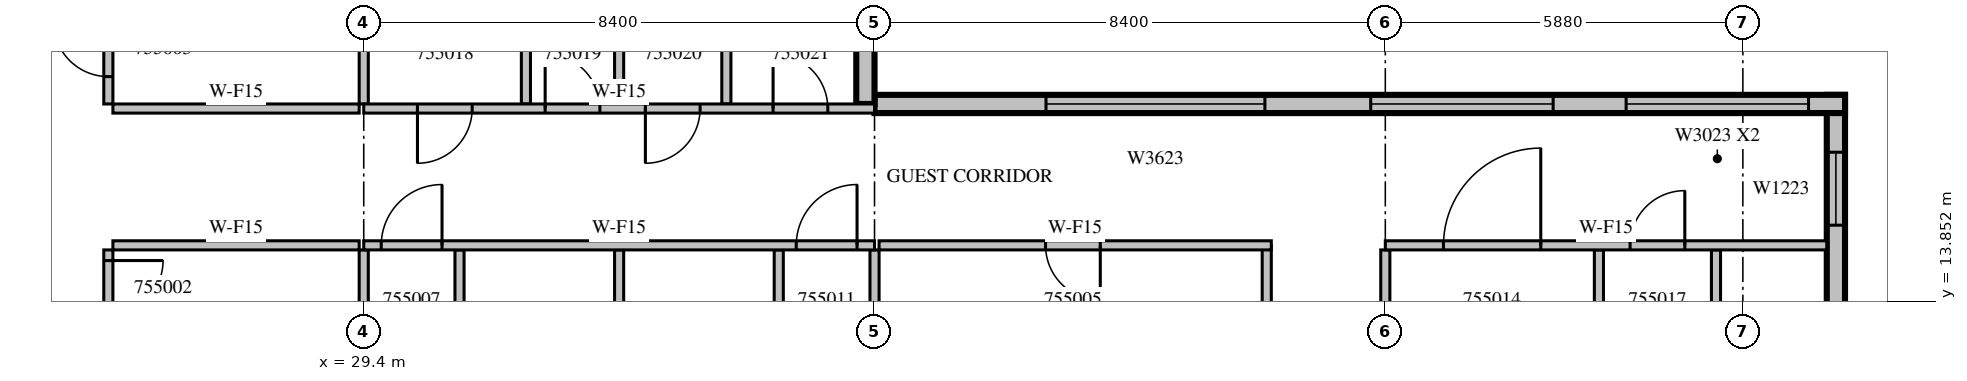
"""IFC4 building model, lengths in metres.
Left out: names, types, materials, properties, quantities, classifications, styles, units other than length and angle.
Written with IfcOpenShell. Run it as: python <this file> out.ifc"""

import sys

from ifc_helpers import new_model, si_unit, direction, frame, frame_2d, origin, place, context, subcontext, project, spatial, rectangle, extrude, source, transform, mapped, element, fill, save


model = new_model("IFC4")
c1 = context("Model", 3, precision=1e-05, world=origin(), true_north=direction((0.0, 1.0)))
c2 = subcontext(c1, "Body", "Model", "MODEL_VIEW")
j1 = project(units=[si_unit("LENGTHUNIT", "METRE"), si_unit("PLANEANGLEUNIT", "RADIAN")], contexts=[c1])
p1 = place(None, origin())
s1 = spatial("IfcSite", under=j1, at=p1, CompositionType="ELEMENT")
p2 = place(p1, origin())
s2 = spatial("IfcBuilding", under=s1, at=p2, CompositionType="ELEMENT")
p3 = place(p2, frame((0.0, 0.0, 242.4)))
s3 = spatial("IfcBuildingStorey", under=s2, at=p3, CompositionType="ELEMENT", Elevation=242.4)
m1 = source(origin(), c2, "Body", "SweptSolid", [
    extrude(rectangle(XDim=6.75, YDim=0.3, at=frame_2d((3.375, 0.0))), origin(), (0.0, 0.0, 1.0), 3.4),
])
p4 = place(p3, frame((53.61, 10.5, 0.0), z_axis=(0.0, 0.0, 1.0), x_axis=(0.0, 1.0, 0.0)))
e1 = element("IfcWall", 1, at=p4, inside=s3, PredefinedType="STANDARD", context=c2, shape_type="MappedRepresentation", body=[
    mapped(m1, transform((0.0, 0.0, 0.0), scale=1.0)),
])
m2 = source(origin(), c2, "Body", "SweptSolid", [
    extrude(rectangle(XDim=1.8, YDim=2.3, at=frame_2d((0.9, 1.15))), frame((0.0, 0.16, 0.0), z_axis=(0.0, -1.0, 0.0), x_axis=(1.0, 0.0, 0.0)), (0.0, 0.0, 1.0), 0.32),
])
p5 = place(p4, frame((0.787, 0.0, 0.6)))
e2 = element("IfcOpeningElement", 2, at=p5, cuts=e1, PredefinedType="OPENING", context=c2, shape_type="MappedRepresentation", body=[
    mapped(m2, transform((0.0, 0.0, 0.0), scale=1.0)),
])
m3 = source(origin(), c2, "Body", "SweptSolid", [
    extrude(rectangle(XDim=1.2, YDim=2.3, at=frame_2d((0.6, 1.15))), frame((0.0, 0.16, 0.0), z_axis=(0.0, -1.0, 0.0), x_axis=(1.0, 0.0, 0.0)), (0.0, 0.0, 1.0), 0.32),
])
p6 = place(p4, frame((4.606, 0.0, 0.6)))
e3 = element("IfcOpeningElement", 3, at=p6, cuts=e1, PredefinedType="OPENING", context=c2, shape_type="MappedRepresentation", body=[
    mapped(m3, transform((0.0, 0.0, 0.0), scale=1.0)),
])
m4 = source(origin(), c2, "Body", "SweptSolid", [
    extrude(rectangle(XDim=15.96, YDim=0.3, at=frame_2d((7.98, 0.0))), origin(), (0.0, 0.0, 1.0), 3.4),
])
p7 = place(p3, frame((53.76, 17.1, 0.0), z_axis=(0.0, 0.0, 1.0), x_axis=(-1.0, 0.0, 0.0)))
e4 = element("IfcWall", 4, at=p7, inside=s3, PredefinedType="STANDARD", context=c2, shape_type="MappedRepresentation", body=[
    mapped(m4, transform((0.0, 0.0, 0.0), scale=1.0)),
])
m5 = source(origin(), c2, "Body", "SweptSolid", [
    extrude(rectangle(XDim=3.0, YDim=2.3, at=frame_2d((1.5, 1.15))), frame((0.0, 0.16, 0.0), z_axis=(0.0, -1.0, 0.0), x_axis=(1.0, 0.0, 0.0)), (0.0, 0.0, 1.0), 0.32),
])
p8 = place(p7, frame((0.6, 0.0, 0.6)))
e5 = element("IfcOpeningElement", 5, at=p8, cuts=e4, PredefinedType="OPENING", context=c2, shape_type="MappedRepresentation", body=[
    mapped(m5, transform((0.0, 0.0, 0.0), scale=1.0)),
])
p9 = place(p7, frame((4.8, 0.0, 0.6)))
e6 = element("IfcOpeningElement", 6, at=p9, cuts=e4, PredefinedType="OPENING", context=c2, shape_type="MappedRepresentation", body=[
    mapped(m5, transform((0.0, 0.0, 0.0), scale=1.0)),
])
m6 = source(origin(), c2, "Body", "SweptSolid", [
    extrude(rectangle(XDim=3.6, YDim=2.3, at=frame_2d((1.8, 1.15))), frame((0.0, 0.16, 0.0), z_axis=(0.0, -1.0, 0.0), x_axis=(1.0, 0.0, 0.0)), (0.0, 0.0, 1.0), 0.32),
])
p10 = place(p7, frame((9.54, 0.0, 0.6)))
e7 = element("IfcOpeningElement", 7, at=p10, cuts=e4, PredefinedType="OPENING", context=c2, shape_type="MappedRepresentation", body=[
    mapped(m6, transform((0.0, 0.0, 0.0), scale=1.0)),
])
m7 = source(origin(), c2, "Body", "SweptSolid", [
    extrude(rectangle(XDim=3.1, YDim=0.3, at=frame_2d((1.55, 0.0))), origin(), (0.0, 0.0, 1.0), 3.4),
])
p11 = place(p3, frame((37.65, 17.1, 0.0), z_axis=(0.0, 0.0, 1.0), x_axis=(0.0, 1.0, 0.0)))
e8 = element("IfcWall", 8, at=p11, inside=s3, PredefinedType="STANDARD", context=c2, shape_type="MappedRepresentation", body=[
    mapped(m7, transform((0.0, 0.0, 0.0), scale=1.0)),
])
p12 = place(p11, frame((1.125, 0.0, 0.6)))
e9 = element("IfcOpeningElement", 9, at=p12, cuts=e8, PredefinedType="OPENING", context=c2, shape_type="MappedRepresentation", body=[
    mapped(m2, transform((0.0, 0.0, 0.0), scale=1.0)),
])
m8 = source(origin(), c2, "Body", "SweptSolid", [
    extrude(rectangle(XDim=11.225, YDim=0.15, at=frame_2d((5.612, 0.0))), origin(), (0.0, 0.0, 1.0), 3.4),
])
p13 = place(p3, frame((25.2, 14.7, 0.0), z_axis=(0.0, 0.0, 1.0), x_axis=(0.0, -1.0, 0.0)))
e10 = element("IfcWall", 10, at=p13, inside=s3, PredefinedType="PARTITIONING", context=c2, shape_type="MappedRepresentation", body=[
    mapped(m8, transform((0.0, 0.0, 0.0), scale=1.0)),
])
m9 = source(origin(), c2, "Body", "SweptSolid", [
    extrude(rectangle(XDim=0.9, YDim=2.1, at=frame_2d((0.45, 1.05))), frame((0.0, 0.085, 0.0), z_axis=(0.0, -1.0, 0.0), x_axis=(1.0, 0.0, 0.0)), (0.0, 0.0, 1.0), 0.17),
])
p14 = place(p13, frame((6.662, 0.0, 0.0)))
e11 = element("IfcOpeningElement", 11, at=p14, cuts=e10, PredefinedType="OPENING", context=c2, shape_type="MappedRepresentation", body=[
    mapped(m9, transform((0.0, 0.0, 0.0), scale=1.0)),
])
p15 = place(p13, frame((0.175, 0.0, 0.0)))
e12 = element("IfcOpeningElement", 12, at=p15, cuts=e10, PredefinedType="OPENING", context=c2, shape_type="MappedRepresentation", body=[
    mapped(m9, transform((0.0, 0.0, 0.0), scale=1.0)),
])
m10 = source(origin(), c2, "Body", "SweptSolid", [
    extrude(rectangle(XDim=3.6, YDim=0.15, at=frame_2d((1.8, 0.0))), origin(), (0.0, 0.0, 1.0), 3.4),
])
p16 = place(p3, frame((25.2, 20.7, 0.0), z_axis=(0.0, 0.0, 1.0), x_axis=(0.0, -1.0, 0.0)))
e13 = element("IfcWall", 13, at=p16, inside=s3, PredefinedType="PARTITIONING", context=c2, shape_type="MappedRepresentation", body=[
    mapped(m10, transform((0.0, 0.0, 0.0), scale=1.0)),
])
p17 = place(p16, frame((2.25, 0.0, 0.0)))
e14 = element("IfcOpeningElement", 14, at=p17, cuts=e13, PredefinedType="OPENING", context=c2, shape_type="MappedRepresentation", body=[
    mapped(m9, transform((0.0, 0.0, 0.0), scale=1.0)),
])
m11 = source(origin(), c2, "Body", "SweptSolid", [
    extrude(rectangle(XDim=4.05, YDim=0.15, at=frame_2d((2.025, 0.0))), origin(), (0.0, 0.0, 1.0), 3.4),
])
for number, where, z_axis, x_axis in (
    (15, (29.325, 14.775, 0.0), (0.0, 0.0, 1.0), (-1.0, 0.0, 0.0)),
    (16, (25.275, 17.025, 0.0), (0.0, 0.0, 1.0), (1.0, 0.0, 0.0)),
):
    element("IfcWall", number, at=place(p3, frame(where, z_axis=z_axis, x_axis=x_axis)), inside=s3, PredefinedType="PARTITIONING", context=c2, shape_type="MappedRepresentation", body=[
        mapped(m11, transform((0.0, 0.0, 0.0), scale=1.0)),
    ])
m12 = source(origin(), c2, "Body", "SweptSolid", [
    extrude(rectangle(XDim=3.801, YDim=0.15, at=frame_2d((1.901, 0.0))), origin(), (0.0, 0.0, 1.0), 3.4),
])
p18 = place(p3, frame((29.4, 10.899, 0.0), z_axis=(0.0, 0.0, 1.0), x_axis=(0.0, 1.0, 0.0)))
e17 = element("IfcWall", 17, at=p18, inside=s3, PredefinedType="PARTITIONING", context=c2, shape_type="MappedRepresentation", body=[
    mapped(m12, transform((0.0, 0.0, 0.0), scale=1.0)),
])
m13 = source(origin(), c2, "Body", "SweptSolid", [
    extrude(rectangle(XDim=3.101, YDim=0.15, at=frame_2d((1.55, 0.0))), origin(), (0.0, 0.0, 1.0), 3.4),
])
p19 = place(p3, frame((29.4, 17.1, 0.0), z_axis=(0.0, 0.0, 1.0), x_axis=(0.0, 1.0, 0.0)))
e18 = element("IfcWall", 18, at=p19, inside=s3, PredefinedType="PARTITIONING", context=c2, shape_type="MappedRepresentation", body=[
    mapped(m13, transform((0.0, 0.0, 0.0), scale=1.0)),
])
m14 = source(origin(), c2, "Body", "SweptSolid", [
    extrude(rectangle(XDim=3.675, YDim=0.15, at=frame_2d((1.837, 0.0))), origin(), (0.0, 0.0, 1.0), 3.4),
])
p20 = place(p3, frame((44.25, 11.1, 0.0), z_axis=(0.0, 0.0, 1.0), x_axis=(0.0, 1.0, 0.0)))
e19 = element("IfcWall", 19, at=p20, inside=s3, PredefinedType="PARTITIONING", context=c2, shape_type="MappedRepresentation", body=[
    mapped(m14, transform((0.0, 0.0, 0.0), scale=1.0)),
])
m15 = source(origin(), c2, "Body", "SweptSolid", [
    extrude(rectangle(XDim=6.45, YDim=0.15, at=frame_2d((3.225, 0.0))), origin(), (0.0, 0.0, 1.0), 3.4),
])
p21 = place(p3, frame((44.325, 14.775, 0.0), z_axis=(0.0, 0.0, 1.0), x_axis=(-1.0, 0.0, 0.0)))
e20 = element("IfcWall", 20, at=p21, inside=s3, PredefinedType="PARTITIONING", context=c2, shape_type="MappedRepresentation", body=[
    mapped(m15, transform((0.0, 0.0, 0.0), scale=1.0)),
])
p22 = place(p21, frame((2.812, 0.0, 0.0)))
e21 = element("IfcOpeningElement", 21, at=p22, cuts=e20, PredefinedType="OPENING", context=c2, shape_type="MappedRepresentation", body=[
    mapped(m9, transform((0.0, 0.0, 0.0), scale=1.0)),
])
m16 = source(origin(), c2, "Body", "SweptSolid", [
    extrude(rectangle(XDim=3.65, YDim=0.15, at=frame_2d((1.825, 0.0))), origin(), (0.0, 0.0, 1.0), 3.4),
])
for number, where, z_axis, x_axis in (
    (22, (30.975, 11.05, 0.0), (0.0, 0.0, 1.0), (0.0, 1.0, 0.0)),
    (23, (33.6, 11.05, 0.0), (0.0, 0.0, 1.0), (0.0, 1.0, 0.0)),
    (24, (36.225, 11.05, 0.0), (0.0, 0.0, 1.0), (0.0, 1.0, 0.0)),
    (25, (37.8, 11.05, 0.0), (0.0, 0.0, 1.0), (0.0, 1.0, 0.0)),
    (26, (49.713, 11.05, 0.0), (0.0, 0.0, 1.0), (0.0, 1.0, 0.0)),
):
    element("IfcWall", number, at=place(p3, frame(where, z_axis=z_axis, x_axis=x_axis)), inside=s3, PredefinedType="PARTITIONING", context=c2, shape_type="MappedRepresentation", body=[
        mapped(m16, transform((0.0, 0.0, 0.0), scale=1.0)),
    ])
p23 = place(p3, frame((51.638, 11.05, 0.0), z_axis=(0.0, 0.0, 1.0), x_axis=(0.0, 1.0, 0.0)))
e27 = element("IfcWall", 27, at=p23, inside=s3, PredefinedType="PARTITIONING", context=c2, shape_type="MappedRepresentation", body=[
    mapped(m16, transform((0.0, 0.0, 0.0), scale=1.0)),
])
p24 = place(p23, frame((1.375, 0.0, 0.0)))
e28 = element("IfcOpeningElement", 28, at=p24, cuts=e27, PredefinedType="OPENING", context=c2, shape_type="MappedRepresentation", body=[
    mapped(m9, transform((0.0, 0.0, 0.0), scale=1.0)),
])
p25 = place(p3, frame((46.2, 11.05, 0.0), z_axis=(0.0, 0.0, 1.0), x_axis=(0.0, 1.0, 0.0)))
e29 = element("IfcWall", 29, at=p25, inside=s3, PredefinedType="PARTITIONING", context=c2, shape_type="MappedRepresentation", body=[
    mapped(m16, transform((0.0, 0.0, 0.0), scale=1.0)),
])
for number, where, z_axis, x_axis in (
    (30, (32.067, 20.7, 0.0), (0.0, 0.0, 1.0), (0.0, -1.0, 0.0)),
    (31, (35.363, 20.7, 0.0), (0.0, 0.0, 1.0), (0.0, -1.0, 0.0)),
    (32, (33.6, 17.1, 0.0), (0.0, 0.0, 1.0), (0.0, 1.0, 0.0)),
):
    element("IfcWall", number, at=place(p3, frame(where, z_axis=z_axis, x_axis=x_axis)), inside=s3, PredefinedType="PARTITIONING", context=c2, shape_type="MappedRepresentation", body=[
        mapped(m10, transform((0.0, 0.0, 0.0), scale=1.0)),
    ])
m17 = source(origin(), c2, "Body", "SweptSolid", [
    extrude(rectangle(XDim=8.4, YDim=0.15, at=frame_2d((4.2, 0.0))), origin(), (0.0, 0.0, 1.0), 3.4),
])
p26 = place(p3, frame((37.8, 14.775, 0.0), z_axis=(0.0, 0.0, 1.0), x_axis=(-1.0, 0.0, 0.0)))
e33 = element("IfcWall", 33, at=p26, inside=s3, PredefinedType="PARTITIONING", context=c2, shape_type="MappedRepresentation", body=[
    mapped(m17, transform((0.0, 0.0, 0.0), scale=1.0)),
])
m18 = source(origin(), c2, "Body", "SweptSolid", [
    extrude(rectangle(XDim=1.0, YDim=2.1, at=frame_2d((0.5, 1.05))), frame((0.0, 0.085, 0.0), z_axis=(0.0, -1.0, 0.0), x_axis=(1.0, 0.0, 0.0)), (0.0, 0.0, 1.0), 0.17),
])
p27 = place(p26, frame((7.112, 0.0, 0.0)))
e34 = element("IfcOpeningElement", 34, at=p27, cuts=e33, PredefinedType="OPENING", context=c2, shape_type="MappedRepresentation", body=[
    mapped(m18, transform((0.0, 0.0, 0.0), scale=1.0)),
])
p28 = place(p26, frame((0.287, 0.0, 0.0)))
e35 = element("IfcOpeningElement", 35, at=p28, cuts=e33, PredefinedType="OPENING", context=c2, shape_type="MappedRepresentation", body=[
    mapped(m18, transform((0.0, 0.0, 0.0), scale=1.0)),
])
m19 = source(origin(), c2, "Body", "SweptSolid", [
    extrude(rectangle(XDim=7.26, YDim=0.15, at=frame_2d((3.63, 0.0))), origin(), (0.0, 0.0, 1.0), 3.4),
])
p29 = place(p3, frame((53.46, 14.775, 0.0), z_axis=(0.0, 0.0, 1.0), x_axis=(-1.0, 0.0, 0.0)))
e36 = element("IfcWall", 36, at=p29, inside=s3, PredefinedType="PARTITIONING", context=c2, shape_type="MappedRepresentation", body=[
    mapped(m19, transform((0.0, 0.0, 0.0), scale=1.0)),
])
m20 = source(origin(), c2, "Body", "SweptSolid", [
    extrude(rectangle(XDim=1.6, YDim=2.1, at=frame_2d((0.8, 1.05))), frame((0.0, 0.085, 0.0), z_axis=(0.0, -1.0, 0.0), x_axis=(1.0, 0.0, 0.0)), (0.0, 0.0, 1.0), 0.17),
])
p30 = place(p29, frame((4.704, 0.0, 0.0)))
e37 = element("IfcOpeningElement", 37, at=p30, cuts=e36, PredefinedType="OPENING", context=c2, shape_type="MappedRepresentation", body=[
    mapped(m20, transform((0.0, 0.0, 0.0), scale=1.0)),
])
p31 = place(p29, frame((2.335, 0.0, 0.0)))
e38 = element("IfcOpeningElement", 38, at=p31, cuts=e36, PredefinedType="OPENING", context=c2, shape_type="MappedRepresentation", body=[
    mapped(m9, transform((0.0, 0.0, 0.0), scale=1.0)),
])
p32 = place(p3, frame((29.4, 17.025, 0.0), z_axis=(0.0, 0.0, 1.0), x_axis=(1.0, 0.0, 0.0)))
e39 = element("IfcWall", 39, at=p32, inside=s3, PredefinedType="PARTITIONING", context=c2, shape_type="MappedRepresentation", body=[
    mapped(m17, transform((0.0, 0.0, 0.0), scale=1.0)),
])
p33 = place(p32, frame((0.883, 0.0, 0.0)))
e40 = element("IfcOpeningElement", 40, at=p33, cuts=e39, PredefinedType="OPENING", context=c2, shape_type="MappedRepresentation", body=[
    mapped(m9, transform((0.0, 0.0, 0.0), scale=1.0)),
])
p34 = place(p32, frame((2.983, 0.0, 0.0)))
e41 = element("IfcOpeningElement", 41, at=p34, cuts=e39, PredefinedType="OPENING", context=c2, shape_type="MappedRepresentation", body=[
    mapped(m9, transform((0.0, 0.0, 0.0), scale=1.0)),
])
p35 = place(p32, frame((4.632, 0.0, 0.0)))
e42 = element("IfcOpeningElement", 42, at=p35, cuts=e39, PredefinedType="OPENING", context=c2, shape_type="MappedRepresentation", body=[
    mapped(m9, transform((0.0, 0.0, 0.0), scale=1.0)),
])
p36 = place(p32, frame((6.732, 0.0, 0.0)))
e43 = element("IfcOpeningElement", 43, at=p36, cuts=e39, PredefinedType="OPENING", context=c2, shape_type="MappedRepresentation", body=[
    mapped(m9, transform((0.0, 0.0, 0.0), scale=1.0)),
])
m21 = source(origin(), c2, "Body", "SweptSolid", [
    extrude(rectangle(XDim=1.2, YDim=2.3, at=frame_2d((0.6, 1.15))), frame((0.0, 0.03, 0.0), z_axis=(0.0, -1.0, 0.0), x_axis=(1.0, 0.0, 0.0)), (0.0, 0.0, 1.0), 0.06),
])
p37 = place(p6, origin())
e44 = element("IfcWindow", 44, at=p37, inside=s3, PartitioningType="SINGLE_PANEL", PredefinedType="WINDOW", context=c2, shape_type="MappedRepresentation", body=[
    mapped(m21, transform((0.0, 0.0, 0.0), scale=1.0)),
])
fill(e3, e44)
m22 = source(origin(), c2, "Body", "SweptSolid", [
    extrude(rectangle(XDim=3.0, YDim=2.3, at=frame_2d((1.5, 1.15))), frame((0.0, 0.03, 0.0), z_axis=(0.0, -1.0, 0.0), x_axis=(1.0, 0.0, 0.0)), (0.0, 0.0, 1.0), 0.06),
])
p38 = place(p8, origin())
e45 = element("IfcWindow", 45, at=p38, inside=s3, PartitioningType="SINGLE_PANEL", PredefinedType="WINDOW", context=c2, shape_type="MappedRepresentation", body=[
    mapped(m22, transform((0.0, 0.0, 0.0), scale=1.0)),
])
fill(e5, e45)
p39 = place(p9, origin())
e46 = element("IfcWindow", 46, at=p39, inside=s3, PartitioningType="SINGLE_PANEL", PredefinedType="WINDOW", context=c2, shape_type="MappedRepresentation", body=[
    mapped(m22, transform((0.0, 0.0, 0.0), scale=1.0)),
])
fill(e6, e46)
m23 = source(origin(), c2, "Body", "SweptSolid", [
    extrude(rectangle(XDim=3.6, YDim=2.3, at=frame_2d((1.8, 1.15))), frame((0.0, 0.03, 0.0), z_axis=(0.0, -1.0, 0.0), x_axis=(1.0, 0.0, 0.0)), (0.0, 0.0, 1.0), 0.06),
])
p40 = place(p10, origin())
e47 = element("IfcWindow", 47, at=p40, inside=s3, PartitioningType="SINGLE_PANEL", PredefinedType="WINDOW", context=c2, shape_type="MappedRepresentation", body=[
    mapped(m23, transform((0.0, 0.0, 0.0), scale=1.0)),
])
fill(e7, e47)
m24 = source(origin(), c2, "Body", "SweptSolid", [
    extrude(rectangle(XDim=0.9, YDim=2.1, at=frame_2d((0.45, 1.05))), frame((0.0, 0.025, 0.0), z_axis=(0.0, -1.0, 0.0), x_axis=(1.0, 0.0, 0.0)), (0.0, 0.0, 1.0), 0.05),
])
p41 = place(p15, origin())
e48 = element("IfcDoor", 48, at=p41, inside=s3, OperationType="SINGLE_SWING_LEFT", PredefinedType="DOOR", context=c2, shape_type="MappedRepresentation", body=[
    mapped(m24, transform((0.0, 0.0, 0.0), scale=1.0)),
])
fill(e12, e48)
p42 = place(p17, origin())
e49 = element("IfcDoor", 49, at=p42, inside=s3, OperationType="SINGLE_SWING_RIGHT", PredefinedType="DOOR", context=c2, shape_type="MappedRepresentation", body=[
    mapped(m24, transform((0.0, 0.0, 0.0), scale=1.0)),
])
fill(e14, e49)
p43 = place(p22, origin())
e50 = element("IfcDoor", 50, at=p43, inside=s3, OperationType="SINGLE_SWING_LEFT", PredefinedType="DOOR", context=c2, shape_type="MappedRepresentation", body=[
    mapped(m24, transform((0.0, 0.0, 0.0), scale=1.0)),
])
fill(e21, e50)
m25 = source(origin(), c2, "Body", "SweptSolid", [
    extrude(rectangle(XDim=1.0, YDim=2.1, at=frame_2d((0.5, 1.05))), frame((0.0, 0.025, 0.0), z_axis=(0.0, -1.0, 0.0), x_axis=(1.0, 0.0, 0.0)), (0.0, 0.0, 1.0), 0.05),
])
p44 = place(p27, origin())
e51 = element("IfcDoor", 51, at=p44, inside=s3, OperationType="SINGLE_SWING_RIGHT", PredefinedType="DOOR", context=c2, shape_type="MappedRepresentation", body=[
    mapped(m25, transform((0.0, 0.0, 0.0), scale=1.0)),
])
fill(e34, e51)
p45 = place(p28, origin())
e52 = element("IfcDoor", 52, at=p45, inside=s3, OperationType="SINGLE_SWING_RIGHT", PredefinedType="DOOR", context=c2, shape_type="MappedRepresentation", body=[
    mapped(m25, transform((0.0, 0.0, 0.0), scale=1.0)),
])
fill(e35, e52)
m26 = source(origin(), c2, "Body", "SweptSolid", [
    extrude(rectangle(XDim=1.6, YDim=2.1, at=frame_2d((0.8, 1.05))), frame((0.0, 0.025, 0.0), z_axis=(0.0, -1.0, 0.0), x_axis=(1.0, 0.0, 0.0)), (0.0, 0.0, 1.0), 0.05),
])
p46 = place(p30, origin())
e53 = element("IfcDoor", 53, at=p46, inside=s3, OperationType="SINGLE_SWING_RIGHT", PredefinedType="DOOR", context=c2, shape_type="MappedRepresentation", body=[
    mapped(m26, transform((0.0, 0.0, 0.0), scale=1.0)),
])
fill(e37, e53)
p47 = place(p31, origin())
e54 = element("IfcDoor", 54, at=p47, inside=s3, OperationType="SINGLE_SWING_RIGHT", PredefinedType="DOOR", context=c2, shape_type="MappedRepresentation", body=[
    mapped(m24, transform((0.0, 0.0, 0.0), scale=1.0)),
])
fill(e38, e54)
p48 = place(p33, origin())
e55 = element("IfcDoor", 55, at=p48, inside=s3, OperationType="SINGLE_SWING_RIGHT", PredefinedType="DOOR", context=c2, shape_type="MappedRepresentation", body=[
    mapped(m24, transform((0.0, 0.0, 0.0), scale=1.0)),
])
fill(e40, e55)
p49 = place(p34, origin())
e56 = element("IfcDoor", 56, at=p49, inside=s3, OperationType="SINGLE_SWING_LEFT", PredefinedType="DOOR", context=c2, shape_type="MappedRepresentation", body=[
    mapped(m24, transform((0.0, 0.0, 0.0), scale=1.0)),
])
fill(e41, e56)
p50 = place(p35, origin())
e57 = element("IfcDoor", 57, at=p50, inside=s3, OperationType="SINGLE_SWING_RIGHT", PredefinedType="DOOR", context=c2, shape_type="MappedRepresentation", body=[
    mapped(m24, transform((0.0, 0.0, 0.0), scale=1.0)),
])
fill(e42, e57)
p51 = place(p36, origin())
e58 = element("IfcDoor", 58, at=p51, inside=s3, OperationType="SINGLE_SWING_LEFT", PredefinedType="DOOR", context=c2, shape_type="MappedRepresentation", body=[
    mapped(m24, transform((0.0, 0.0, 0.0), scale=1.0)),
])
fill(e43, e58)
save(model, sys.argv[1])
